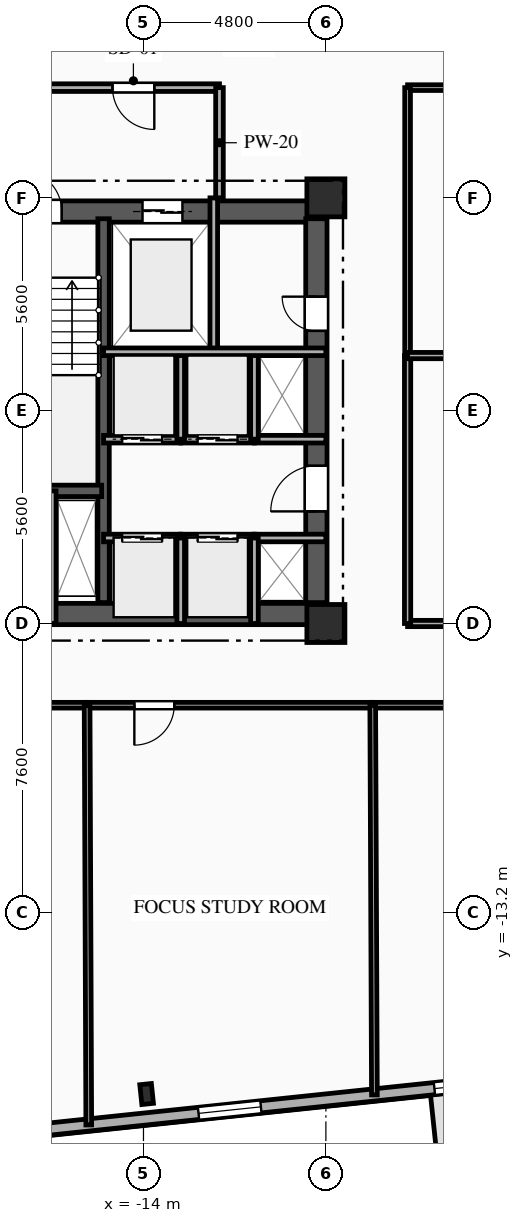
"""IFC4 building model, lengths in metres.
Left out: names, types, materials, properties, quantities, classifications, styles, units other than length and angle.
Written with IfcOpenShell. Run it as: python <this file> out.ifc"""

import sys

from ifc_helpers import new_model, si_unit, direction, frame, frame_2d, origin, origin_2d, place, context, subcontext, project, spatial, rectangle, i_section, extrude, element, fill, save


model = new_model("IFC4")
c1 = context("Model", 3, precision=1e-05, world=origin(), true_north=direction((0.0, 1.0)))
c2 = subcontext(c1, "Body", "Model", "MODEL_VIEW")
j1 = project(units=[si_unit("LENGTHUNIT", "METRE"), si_unit("PLANEANGLEUNIT", "RADIAN")], contexts=[c1])
p1 = place(None, origin())
s1 = spatial("IfcSite", under=j1, at=p1, CompositionType="ELEMENT")
p2 = place(p1, origin())
s2 = spatial("IfcBuilding", under=s1, at=p2, CompositionType="ELEMENT")
p3 = place(p2, frame((0.0, 0.0, 99.1)))
s3 = spatial("IfcBuildingStorey", under=s2, at=p3, CompositionType="ELEMENT", Elevation=99.1)
for number, where, z_axis, x_axis in (
    (1, (-9.2, -5.6, 0.0), (0.0, 0.0, 1.0), (1.0, 0.0, 0.0)),
    (2, (-9.2, 5.6, 0.0), (0.0, 0.0, 1.0), (1.0, 0.0, 0.0)),
):
    element("IfcColumn", number, at=place(p3, frame(where, z_axis=z_axis, x_axis=x_axis)), inside=s3, PredefinedType="COLUMN", context=c2, shape_type="SweptSolid", body=[
        extrude(rectangle(XDim=1.0, YDim=1.0, at=origin_2d()), origin(), (0.0, 0.0, 1.0), 3.35),
    ])
p4 = place(p3, frame((-13.917, -17.98, 0.0), z_axis=(0.0, 0.0, 1.0), x_axis=(0.994521895368, 0.104528463268, 0.0)))
e3 = element("IfcColumn", 3, at=p4, inside=s3, PredefinedType="COLUMN", context=c2, shape_type="SweptSolid", body=[
    extrude(i_section(OverallWidth=0.306, OverallDepth=0.524, WebThickness=0.021, FlangeThickness=0.04, FilletRadius=0.027, at=origin_2d()), origin(), (0.0, 0.0, 1.0), 3.35),
])
p5 = place(p3, frame((-2.015, -17.383, 0.0), z_axis=(0.0, 0.0, 1.0), x_axis=(-0.994521393935, -0.104533233979, 0.0)))
e4 = element("IfcWall", 4, at=p5, inside=s3, PredefinedType="SOLIDWALL", context=c2, shape_type="SweptSolid", body=[
    extrude(rectangle(XDim=21.3, YDim=0.32, at=frame_2d((10.65, 0.0))), origin(), (0.0, 0.0, 1.0), 3.045),
])
p6 = place(p5, frame((1.953, 0.0, 0.85)))
e5 = element("IfcOpeningElement", 5, at=p6, cuts=e4, PredefinedType="OPENING", context=c2, shape_type="SweptSolid", body=[
    extrude(rectangle(XDim=2.4, YDim=1.95, at=frame_2d((1.2, 0.975))), frame((0.0, 0.17, 0.0), z_axis=(0.0, -1.0, 0.0), x_axis=(1.0, 0.0, 0.0)), (0.0, 0.0, 1.0), 0.34),
])
p7 = place(p5, frame((8.944, 0.0, 0.85)))
e6 = element("IfcOpeningElement", 6, at=p7, cuts=e4, PredefinedType="OPENING", context=c2, shape_type="SweptSolid", body=[
    extrude(rectangle(XDim=1.65, YDim=1.85, at=frame_2d((0.825, 0.925))), frame((0.0, 0.17, 0.0), z_axis=(0.0, -1.0, 0.0), x_axis=(1.0, 0.0, 0.0)), (0.0, 0.0, 1.0), 0.34),
])
p8 = place(p5, frame((16.391, 0.0, 0.85)))
e7 = element("IfcOpeningElement", 7, at=p8, cuts=e4, PredefinedType="OPENING", context=c2, shape_type="SweptSolid", body=[
    extrude(rectangle(XDim=1.65, YDim=1.85, at=frame_2d((0.825, 0.925))), frame((0.0, 0.17, 0.0), z_axis=(0.0, -1.0, 0.0), x_axis=(1.0, 0.0, 0.0)), (0.0, 0.0, 1.0), 0.34),
])
p9 = place(p3, frame((-18.8, 5.24, 0.0), z_axis=(0.0, 0.0, 1.0), x_axis=(1.0, 0.0, 0.0)))
e8 = element("IfcWall", 8, at=p9, inside=s3, PredefinedType="SHEAR", context=c2, shape_type="SweptSolid", body=[
    extrude(rectangle(XDim=9.6, YDim=0.56, at=frame_2d((4.8, 0.0))), origin(), (0.0, 0.0, 1.0), 3.045),
])
p10 = place(p9, frame((1.55, 0.0, 0.0)))
e9 = element("IfcOpeningElement", 9, at=p10, cuts=e8, PredefinedType="OPENING", context=c2, shape_type="SweptSolid", body=[
    extrude(rectangle(XDim=1.1, YDim=2.15, at=frame_2d((0.55, 1.075))), frame((0.0, 0.29, 0.0), z_axis=(0.0, -1.0, 0.0), x_axis=(1.0, 0.0, 0.0)), (0.0, 0.0, 1.0), 0.58),
])
p11 = place(p9, frame((4.775, 0.0, 0.0)))
e10 = element("IfcOpeningElement", 10, at=p11, cuts=e8, PredefinedType="OPENING", context=c2, shape_type="SweptSolid", body=[
    extrude(rectangle(XDim=1.05, YDim=2.1, at=frame_2d((0.525, 1.05))), frame((0.0, 0.29, 0.0), z_axis=(0.0, -1.0, 0.0), x_axis=(1.0, 0.0, 0.0)), (0.0, 0.0, 1.0), 0.58),
])
p12 = place(p3, frame((-18.8, -5.35, 0.0), z_axis=(0.0, 0.0, 1.0), x_axis=(1.0, 0.0, 0.0)))
e11 = element("IfcWall", 11, at=p12, inside=s3, PredefinedType="SHEAR", context=c2, shape_type="SweptSolid", body=[
    extrude(rectangle(XDim=9.6, YDim=0.56, at=frame_2d((4.8, 0.0))), origin(), (0.0, 0.0, 1.0), 3.045),
])
p13 = place(p12, frame((1.05, 0.0, 0.0)))
e12 = element("IfcOpeningElement", 12, at=p13, cuts=e11, PredefinedType="OPENING", context=c2, shape_type="SweptSolid", body=[
    extrude(rectangle(XDim=0.9, YDim=2.1, at=frame_2d((0.45, 1.05))), frame((0.0, 0.29, 0.0), z_axis=(0.0, -1.0, 0.0), x_axis=(1.0, 0.0, 0.0)), (0.0, 0.0, 1.0), 0.58),
])
p14 = place(p3, frame((-9.45, -5.05, 0.0), z_axis=(0.0, 0.0, 1.0), x_axis=(0.0, 1.0, 0.0)))
e13 = element("IfcWall", 13, at=p14, inside=s3, PredefinedType="SHEAR", context=c2, shape_type="SweptSolid", body=[
    extrude(rectangle(XDim=10.1, YDim=0.56, at=frame_2d((5.05, 0.0))), origin(), (0.0, 0.0, 1.0), 3.045),
])
p15 = place(p14, frame((7.15, 0.0, 0.0)))
e14 = element("IfcOpeningElement", 14, at=p15, cuts=e13, PredefinedType="OPENING", context=c2, shape_type="SweptSolid", body=[
    extrude(rectangle(XDim=0.9, YDim=2.1, at=frame_2d((0.45, 1.05))), frame((0.0, 0.29, 0.0), z_axis=(0.0, -1.0, 0.0), x_axis=(1.0, 0.0, 0.0)), (0.0, 0.0, 1.0), 0.58),
])
p16 = place(p14, frame((2.4, 0.0, 0.0)))
e15 = element("IfcOpeningElement", 15, at=p16, cuts=e13, PredefinedType="OPENING", context=c2, shape_type="SweptSolid", body=[
    extrude(rectangle(XDim=1.2, YDim=2.15, at=frame_2d((0.6, 1.075))), frame((0.0, 0.29, 0.0), z_axis=(0.0, -1.0, 0.0), x_axis=(1.0, 0.0, 0.0)), (0.0, 0.0, 1.0), 0.58),
])
p17 = place(p3, frame((-15.05, -5.05, 0.0), z_axis=(0.0, 0.0, 1.0), x_axis=(0.0, 1.0, 0.0)))
e16 = element("IfcWall", 16, at=p17, inside=s3, PredefinedType="SHEAR", context=c2, shape_type="SweptSolid", body=[
    extrude(rectangle(XDim=10.1, YDim=0.3, at=frame_2d((5.05, 0.0))), origin(), (0.0, 0.0, 1.0), 3.045),
])
p18 = place(p3, frame((-18.28, -2.11, 0.0), z_axis=(0.0, 0.0, 1.0), x_axis=(1.0, 0.0, 0.0)))
e17 = element("IfcWall", 17, at=p18, inside=s3, PredefinedType="SHEAR", context=c2, shape_type="SweptSolid", body=[
    extrude(rectangle(XDim=3.18, YDim=0.3, at=frame_2d((1.59, 0.0))), origin(), (0.0, 0.0, 1.0), 3.045),
])
p19 = place(p3, frame((-16.4, -5.6, 0.0), z_axis=(0.0, 0.0, 1.0), x_axis=(0.0, 1.0, 0.0)))
e18 = element("IfcWall", 18, at=p19, inside=s3, PredefinedType="PARTITIONING", context=c2, shape_type="SweptSolid", body=[
    extrude(rectangle(XDim=3.49, YDim=0.2, at=frame_2d((1.745, 0.0))), origin(), (0.0, 0.0, 1.0), 3.045),
])
p20 = place(p3, frame((-12.15, 1.55, 0.0), z_axis=(0.0, 0.0, 1.0), x_axis=(0.0, 1.0, 0.0)))
e19 = element("IfcWall", 19, at=p20, inside=s3, PredefinedType="PARTITIONING", context=c2, shape_type="SweptSolid", body=[
    extrude(rectangle(XDim=4.05, YDim=0.2, at=frame_2d((2.025, 0.0))), origin(), (0.0, 0.0, 1.0), 3.045),
])
p21 = place(p3, frame((-12.0, 8.5, 0.0), z_axis=(0.0, 0.0, 1.0), x_axis=(-1.0, 0.0, 0.0)))
e20 = element("IfcWall", 20, at=p21, inside=s3, PredefinedType="PARTITIONING", context=c2, shape_type="SweptSolid", body=[
    extrude(rectangle(XDim=6.8, YDim=0.2, at=frame_2d((3.4, 0.0))), origin(), (0.0, 0.0, 1.0), 3.045),
])
p22 = place(p21, frame((1.715, 0.0, 0.0)))
e21 = element("IfcOpeningElement", 21, at=p22, cuts=e20, PredefinedType="OPENING", context=c2, shape_type="SweptSolid", body=[
    extrude(rectangle(XDim=1.1, YDim=2.15, at=frame_2d((0.55, 1.075))), frame((0.0, 0.11, 0.0), z_axis=(0.0, -1.0, 0.0), x_axis=(1.0, 0.0, 0.0)), (0.0, 0.0, 1.0), 0.22),
])
p23 = place(p3, frame((-12.0, 5.6, 0.0), z_axis=(0.0, 0.0, 1.0), x_axis=(0.0, 1.0, 0.0)))
e22 = element("IfcWall", 22, at=p23, inside=s3, PredefinedType="PARTITIONING", context=c2, shape_type="SweptSolid", body=[
    extrude(rectangle(XDim=2.9, YDim=0.2, at=frame_2d((1.45, 0.0))), origin(), (0.0, 0.0, 1.0), 3.045),
])
p24 = place(p3, frame((-15.05, -3.35, 0.0), z_axis=(0.0, 0.0, 1.0), x_axis=(1.0, 0.0, 0.0)))
e23 = element("IfcWall", 23, at=p24, inside=s3, PredefinedType="PARTITIONING", context=c2, shape_type="SweptSolid", body=[
    extrude(rectangle(XDim=2.03, YDim=0.2, at=frame_2d((1.015, 0.0))), origin(), (0.0, 0.0, 1.0), 3.045),
])
p25 = place(p24, frame((0.49, 0.0, 0.0)))
e24 = element("IfcOpeningElement", 24, at=p25, cuts=e23, PredefinedType="OPENING", context=c2, shape_type="SweptSolid", body=[
    extrude(rectangle(XDim=1.05, YDim=2.1, at=frame_2d((0.525, 1.05))), frame((0.0, 0.11, 0.0), z_axis=(0.0, -1.0, 0.0), x_axis=(1.0, 0.0, 0.0)), (0.0, 0.0, 1.0), 0.22),
])
p26 = place(p3, frame((-13.02, -3.35, 0.0), z_axis=(0.0, 0.0, 1.0), x_axis=(1.0, 0.0, 0.0)))
e25 = element("IfcWall", 25, at=p26, inside=s3, PredefinedType="PARTITIONING", context=c2, shape_type="SweptSolid", body=[
    extrude(rectangle(XDim=1.94, YDim=0.2, at=frame_2d((0.97, 0.0))), origin(), (0.0, 0.0, 1.0), 3.045),
])
p27 = place(p26, frame((0.445, 0.0, 0.0)))
e26 = element("IfcOpeningElement", 26, at=p27, cuts=e25, PredefinedType="OPENING", context=c2, shape_type="SweptSolid", body=[
    extrude(rectangle(XDim=1.05, YDim=2.1, at=frame_2d((0.525, 1.05))), frame((0.0, 0.11, 0.0), z_axis=(0.0, -1.0, 0.0), x_axis=(1.0, 0.0, 0.0)), (0.0, 0.0, 1.0), 0.22),
])
p28 = place(p3, frame((-11.08, -3.35, 0.0), z_axis=(0.0, 0.0, 1.0), x_axis=(1.0, 0.0, 0.0)))
e27 = element("IfcWall", 27, at=p28, inside=s3, PredefinedType="PARTITIONING", context=c2, shape_type="SweptSolid", body=[
    extrude(rectangle(XDim=1.88, YDim=0.2, at=frame_2d((0.94, 0.0))), origin(), (0.0, 0.0, 1.0), 2.76),
])
p29 = place(p3, frame((-13.02, -0.75, 0.0), z_axis=(0.0, 0.0, 1.0), x_axis=(-1.0, 0.0, 0.0)))
e28 = element("IfcWall", 28, at=p29, inside=s3, PredefinedType="PARTITIONING", context=c2, shape_type="SweptSolid", body=[
    extrude(rectangle(XDim=2.03, YDim=0.2, at=frame_2d((1.015, 0.0))), origin(), (0.0, 0.0, 1.0), 3.045),
])
p30 = place(p29, frame((0.49, 0.0, 0.0)))
e29 = element("IfcOpeningElement", 29, at=p30, cuts=e28, PredefinedType="OPENING", context=c2, shape_type="SweptSolid", body=[
    extrude(rectangle(XDim=1.05, YDim=2.1, at=frame_2d((0.525, 1.05))), frame((0.0, 0.11, 0.0), z_axis=(0.0, -1.0, 0.0), x_axis=(1.0, 0.0, 0.0)), (0.0, 0.0, 1.0), 0.22),
])
p31 = place(p3, frame((-11.08, -0.75, 0.0), z_axis=(0.0, 0.0, 1.0), x_axis=(-1.0, 0.0, 0.0)))
e30 = element("IfcWall", 30, at=p31, inside=s3, PredefinedType="PARTITIONING", context=c2, shape_type="SweptSolid", body=[
    extrude(rectangle(XDim=1.94, YDim=0.2, at=frame_2d((0.97, 0.0))), origin(), (0.0, 0.0, 1.0), 3.045),
])
p32 = place(p31, frame((0.445, 0.0, 0.0)))
e31 = element("IfcOpeningElement", 31, at=p32, cuts=e30, PredefinedType="OPENING", context=c2, shape_type="SweptSolid", body=[
    extrude(rectangle(XDim=1.05, YDim=2.1, at=frame_2d((0.525, 1.05))), frame((0.0, 0.11, 0.0), z_axis=(0.0, -1.0, 0.0), x_axis=(1.0, 0.0, 0.0)), (0.0, 0.0, 1.0), 0.22),
])
p33 = place(p3, frame((-9.2, -0.75, 0.0), z_axis=(0.0, 0.0, 1.0), x_axis=(-1.0, 0.0, 0.0)))
e32 = element("IfcWall", 32, at=p33, inside=s3, PredefinedType="PARTITIONING", context=c2, shape_type="SweptSolid", body=[
    extrude(rectangle(XDim=1.88, YDim=0.2, at=frame_2d((0.94, 0.0))), origin(), (0.0, 0.0, 1.0), 3.045),
])
for number, where, z_axis, x_axis in (
    (33, (-13.02, -5.6, 0.0), (0.0, 0.0, 1.0), (0.0, 1.0, 0.0)),
    (34, (-11.08, -5.6, 0.0), (0.0, 0.0, 1.0), (0.0, 1.0, 0.0)),
):
    element("IfcWall", number, at=place(p3, frame(where, z_axis=z_axis, x_axis=x_axis)), inside=s3, PredefinedType="PARTITIONING", context=c2, shape_type="SweptSolid", body=[
        extrude(rectangle(XDim=2.25, YDim=0.2, at=frame_2d((1.125, 0.0))), origin(), (0.0, 0.0, 1.0), 3.045),
    ])
for number, where, z_axis, x_axis in (
    (35, (-13.02, -0.75, 0.0), (0.0, 0.0, 1.0), (0.0, 1.0, 0.0)),
    (36, (-11.08, -0.75, 0.0), (0.0, 0.0, 1.0), (0.0, 1.0, 0.0)),
):
    element("IfcWall", number, at=place(p3, frame(where, z_axis=z_axis, x_axis=x_axis)), inside=s3, PredefinedType="PARTITIONING", context=c2, shape_type="SweptSolid", body=[
        extrude(rectangle(XDim=2.3, YDim=0.2, at=frame_2d((1.15, 0.0))), origin(), (0.0, 0.0, 1.0), 3.045),
    ])
p34 = place(p3, frame((0.0, 8.5, 0.0), z_axis=(0.0, 0.0, 1.0), x_axis=(-1.0, 0.0, 0.0)))
e37 = element("IfcWall", 37, at=p34, inside=s3, PredefinedType="PARTITIONING", context=c2, shape_type="SweptSolid", body=[
    extrude(rectangle(XDim=7.05, YDim=0.15, at=frame_2d((3.525, 0.0))), origin(), (0.0, 0.0, 1.0), 3.045),
])
p35 = place(p34, frame((1.185, 0.0, 0.0)))
e38 = element("IfcOpeningElement", 38, at=p35, cuts=e37, PredefinedType="OPENING", context=c2, shape_type="SweptSolid", body=[
    extrude(rectangle(XDim=1.05, YDim=2.15, at=frame_2d((0.525, 1.075))), frame((0.0, 0.085, 0.0), z_axis=(0.0, -1.0, 0.0), x_axis=(1.0, 0.0, 0.0)), (0.0, 0.0, 1.0), 0.17),
])
p36 = place(p3, frame((-15.483, -7.75, 0.0), z_axis=(0.0, 0.0, 1.0), x_axis=(-1.0, 0.0, 0.0)))
e39 = element("IfcWall", 39, at=p36, inside=s3, PredefinedType="PARTITIONING", context=c2, shape_type="SweptSolid", body=[
    extrude(rectangle(XDim=7.517, YDim=0.15, at=frame_2d((3.758, 0.0))), origin(), (0.0, 0.0, 1.0), 3.045),
])
p37 = place(p36, frame((5.223, 0.0, 0.0)))
e40 = element("IfcOpeningElement", 40, at=p37, cuts=e39, PredefinedType="OPENING", context=c2, shape_type="SweptSolid", body=[
    extrude(rectangle(XDim=1.05, YDim=2.15, at=frame_2d((0.525, 1.075))), frame((0.0, 0.085, 0.0), z_axis=(0.0, -1.0, 0.0), x_axis=(1.0, 0.0, 0.0)), (0.0, 0.0, 1.0), 0.17),
])
p38 = place(p3, frame((-7.967, -7.75, 0.0), z_axis=(0.0, 0.0, 1.0), x_axis=(-1.0, 0.0, 0.0)))
e41 = element("IfcWall", 41, at=p38, inside=s3, PredefinedType="PARTITIONING", context=c2, shape_type="SweptSolid", body=[
    extrude(rectangle(XDim=7.516, YDim=0.15, at=frame_2d((3.758, 0.0))), origin(), (0.0, 0.0, 1.0), 3.045),
])
p39 = place(p38, frame((5.223, 0.0, 0.0)))
e42 = element("IfcOpeningElement", 42, at=p39, cuts=e41, PredefinedType="OPENING", context=c2, shape_type="SweptSolid", body=[
    extrude(rectangle(XDim=1.05, YDim=2.15, at=frame_2d((0.525, 1.075))), frame((0.0, 0.085, 0.0), z_axis=(0.0, -1.0, 0.0), x_axis=(1.0, 0.0, 0.0)), (0.0, 0.0, 1.0), 0.17),
])
p40 = place(p3, frame((0.0, -7.75, 0.0), z_axis=(0.0, 0.0, 1.0), x_axis=(-1.0, 0.0, 0.0)))
e43 = element("IfcWall", 43, at=p40, inside=s3, PredefinedType="PARTITIONING", context=c2, shape_type="SweptSolid", body=[
    extrude(rectangle(XDim=7.967, YDim=0.15, at=frame_2d((3.983, 0.0))), origin(), (0.0, 0.0, 1.0), 3.045),
])
p41 = place(p40, frame((1.3, 0.0, 0.0)))
e44 = element("IfcOpeningElement", 44, at=p41, cuts=e43, PredefinedType="OPENING", context=c2, shape_type="SweptSolid", body=[
    extrude(rectangle(XDim=1.05, YDim=2.15, at=frame_2d((0.525, 1.075))), frame((0.0, 0.085, 0.0), z_axis=(0.0, -1.0, 0.0), x_axis=(1.0, 0.0, 0.0)), (0.0, 0.0, 1.0), 0.17),
])
p42 = place(p3, frame((-7.05, -5.6, 0.0), z_axis=(0.0, 0.0, 1.0), x_axis=(1.0, 0.0, 0.0)))
e45 = element("IfcWall", 45, at=p42, inside=s3, PredefinedType="PARTITIONING", context=c2, shape_type="SweptSolid", body=[
    extrude(rectangle(XDim=7.05, YDim=0.165, at=frame_2d((3.525, 0.0))), origin(), (0.0, 0.0, 1.0), 2.53),
])
p43 = place(p42, frame((4.728, 0.0, 0.0)))
e46 = element("IfcOpeningElement", 46, at=p43, cuts=e45, PredefinedType="OPENING", context=c2, shape_type="SweptSolid", body=[
    extrude(rectangle(XDim=1.15, YDim=2.15, at=frame_2d((0.575, 1.075))), frame((0.0, 0.093, 0.0), z_axis=(0.0, -1.0, 0.0), x_axis=(1.0, 0.0, 0.0)), (0.0, 0.0, 1.0), 0.185),
])
p44 = place(p3, frame((-7.05, 1.45, 0.0), z_axis=(0.0, 0.0, 1.0), x_axis=(0.0, -1.0, 0.0)))
e47 = element("IfcWall", 47, at=p44, inside=s3, PredefinedType="PARTITIONING", context=c2, shape_type="SweptSolid", body=[
    extrude(rectangle(XDim=7.05, YDim=0.165, at=frame_2d((3.525, 0.0))), origin(), (0.0, 0.0, 1.0), 3.045),
])
p45 = place(p3, frame((-7.05, 8.5, 0.0), z_axis=(0.0, 0.0, 1.0), x_axis=(0.0, -1.0, 0.0)))
e48 = element("IfcWall", 48, at=p45, inside=s3, PredefinedType="PARTITIONING", context=c2, shape_type="SweptSolid", body=[
    extrude(rectangle(XDim=7.05, YDim=0.15, at=frame_2d((3.525, 0.0))), origin(), (0.0, 0.0, 1.0), 3.045),
])
p46 = place(p3, frame((-15.483, -7.75, 0.0), z_axis=(0.0, 0.0, 1.0), x_axis=(0.003956994399, -0.999992171067, 0.0)))
e49 = element("IfcWall", 49, at=p46, inside=s3, PredefinedType="PARTITIONING", context=c2, shape_type="SweptSolid", body=[
    extrude(rectangle(XDim=11.044, YDim=0.15, at=frame_2d((5.522, 0.0))), origin(), (0.0, 0.0, 1.0), 3.045),
])
p47 = place(p3, frame((-7.967, -7.75, 0.0), z_axis=(0.0, 0.0, 1.0), x_axis=(0.004285674928, -0.999990816453, 0.0)))
e50 = element("IfcWall", 50, at=p47, inside=s3, PredefinedType="PARTITIONING", context=c2, shape_type="SweptSolid", body=[
    extrude(rectangle(XDim=10.254, YDim=0.15, at=frame_2d((5.127, 0.0))), origin(), (0.0, 0.0, 1.0), 3.045),
])
p48 = place(p3, frame((-7.05, 1.45, 0.0), z_axis=(0.0, 0.0, 1.0), x_axis=(1.0, 0.0, 0.0)))
e51 = element("IfcWall", 51, at=p48, inside=s3, PredefinedType="PARTITIONING", context=c2, shape_type="SweptSolid", body=[
    extrude(rectangle(XDim=14.1, YDim=0.165, at=frame_2d((7.05, 0.0))), origin(), (0.0, 0.0, 1.0), 3.045),
])
p49 = place(p3, frame((-15.05, 1.55, 0.0), z_axis=(0.0, 0.0, 1.0), x_axis=(1.0, 0.0, 0.0)))
e52 = element("IfcWall", 52, at=p49, inside=s3, PredefinedType="PARTITIONING", context=c2, shape_type="SweptSolid", body=[
    extrude(rectangle(XDim=5.85, YDim=0.2, at=frame_2d((2.925, 0.0))), origin(), (0.0, 0.0, 1.0), 3.045),
])
p50 = place(p6, origin())
e53 = element("IfcWindow", 53, at=p50, inside=s3, PartitioningType="SINGLE_PANEL", PredefinedType="WINDOW", context=c2, shape_type="SweptSolid", body=[
    extrude(rectangle(XDim=2.4, YDim=1.95, at=frame_2d((1.2, 0.975))), frame((0.0, 0.03, 0.0), z_axis=(0.0, -1.0, 0.0), x_axis=(1.0, 0.0, 0.0)), (0.0, 0.0, 1.0), 0.06),
])
fill(e5, e53)
p51 = place(p7, origin())
e54 = element("IfcWindow", 54, at=p51, inside=s3, PartitioningType="SINGLE_PANEL", PredefinedType="WINDOW", context=c2, shape_type="SweptSolid", body=[
    extrude(rectangle(XDim=1.65, YDim=1.85, at=frame_2d((0.825, 0.925))), frame((0.0, 0.03, 0.0), z_axis=(0.0, -1.0, 0.0), x_axis=(1.0, 0.0, 0.0)), (0.0, 0.0, 1.0), 0.06),
])
fill(e6, e54)
p52 = place(p10, origin())
e55 = element("IfcDoor", 55, at=p52, inside=s3, OperationType="SINGLE_SWING_LEFT", PredefinedType="DOOR", context=c2, shape_type="SweptSolid", body=[
    extrude(rectangle(XDim=1.1, YDim=2.15, at=frame_2d((0.55, 1.075))), frame((0.0, 0.025, 0.0), z_axis=(0.0, -1.0, 0.0), x_axis=(1.0, 0.0, 0.0)), (0.0, 0.0, 1.0), 0.05),
])
fill(e9, e55)
p53 = place(p11, origin())
e56 = element("IfcDoor", 56, at=p53, inside=s3, OperationType="DOUBLE_DOOR_SLIDING", PredefinedType="DOOR", context=c2, shape_type="SweptSolid", body=[
    extrude(rectangle(XDim=1.05, YDim=2.1, at=frame_2d((0.525, 1.05))), frame((0.0, 0.025, 0.0), z_axis=(0.0, -1.0, 0.0), x_axis=(1.0, 0.0, 0.0)), (0.0, 0.0, 1.0), 0.05),
])
fill(e10, e56)
p54 = place(p22, origin())
e57 = element("IfcDoor", 57, at=p54, inside=s3, OperationType="SINGLE_SWING_LEFT", PredefinedType="DOOR", context=c2, shape_type="SweptSolid", body=[
    extrude(rectangle(XDim=1.1, YDim=2.15, at=frame_2d((0.55, 1.075))), frame((0.0, 0.025, 0.0), z_axis=(0.0, -1.0, 0.0), x_axis=(1.0, 0.0, 0.0)), (0.0, 0.0, 1.0), 0.05),
])
fill(e21, e57)
p55 = place(p15, origin())
e58 = element("IfcDoor", 58, at=p55, inside=s3, OperationType="SINGLE_SWING_RIGHT", PredefinedType="DOOR", context=c2, shape_type="SweptSolid", body=[
    extrude(rectangle(XDim=0.9, YDim=2.1, at=frame_2d((0.45, 1.05))), frame((0.0, 0.025, 0.0), z_axis=(0.0, -1.0, 0.0), x_axis=(1.0, 0.0, 0.0)), (0.0, 0.0, 1.0), 0.05),
])
fill(e14, e58)
p56 = place(p25, origin())
e59 = element("IfcDoor", 59, at=p56, inside=s3, OperationType="DOUBLE_DOOR_SLIDING", PredefinedType="DOOR", context=c2, shape_type="SweptSolid", body=[
    extrude(rectangle(XDim=1.05, YDim=2.1, at=frame_2d((0.525, 1.05))), frame((0.0, 0.025, 0.0), z_axis=(0.0, -1.0, 0.0), x_axis=(1.0, 0.0, 0.0)), (0.0, 0.0, 1.0), 0.05),
])
fill(e24, e59)
p57 = place(p27, origin())
e60 = element("IfcDoor", 60, at=p57, inside=s3, OperationType="DOUBLE_DOOR_SLIDING", PredefinedType="DOOR", context=c2, shape_type="SweptSolid", body=[
    extrude(rectangle(XDim=1.05, YDim=2.1, at=frame_2d((0.525, 1.05))), frame((0.0, 0.025, 0.0), z_axis=(0.0, -1.0, 0.0), x_axis=(1.0, 0.0, 0.0)), (0.0, 0.0, 1.0), 0.05),
])
fill(e26, e60)
p58 = place(p30, origin())
e61 = element("IfcDoor", 61, at=p58, inside=s3, OperationType="DOUBLE_DOOR_SLIDING", PredefinedType="DOOR", context=c2, shape_type="SweptSolid", body=[
    extrude(rectangle(XDim=1.05, YDim=2.1, at=frame_2d((0.525, 1.05))), frame((0.0, 0.025, 0.0), z_axis=(0.0, -1.0, 0.0), x_axis=(1.0, 0.0, 0.0)), (0.0, 0.0, 1.0), 0.05),
])
fill(e29, e61)
p59 = place(p32, origin())
e62 = element("IfcDoor", 62, at=p59, inside=s3, OperationType="DOUBLE_DOOR_SLIDING", PredefinedType="DOOR", context=c2, shape_type="SweptSolid", body=[
    extrude(rectangle(XDim=1.05, YDim=2.1, at=frame_2d((0.525, 1.05))), frame((0.0, 0.025, 0.0), z_axis=(0.0, -1.0, 0.0), x_axis=(1.0, 0.0, 0.0)), (0.0, 0.0, 1.0), 0.05),
])
fill(e31, e62)
p60 = place(p16, origin())
e63 = element("IfcDoor", 63, at=p60, inside=s3, OperationType="SINGLE_SWING_LEFT", PredefinedType="DOOR", context=c2, shape_type="SweptSolid", body=[
    extrude(rectangle(XDim=1.2, YDim=2.15, at=frame_2d((0.6, 1.075))), frame((0.0, 0.025, 0.0), z_axis=(0.0, -1.0, 0.0), x_axis=(1.0, 0.0, 0.0)), (0.0, 0.0, 1.0), 0.05),
])
fill(e15, e63)
p61 = place(p39, origin())
e64 = element("IfcDoor", 64, at=p61, inside=s3, OperationType="SINGLE_SWING_RIGHT", PredefinedType="DOOR", context=c2, shape_type="SweptSolid", body=[
    extrude(rectangle(XDim=1.05, YDim=2.15, at=frame_2d((0.525, 1.075))), frame((0.0, 0.025, 0.0), z_axis=(0.0, -1.0, 0.0), x_axis=(1.0, 0.0, 0.0)), (0.0, 0.0, 1.0), 0.05),
])
fill(e42, e64)
save(model, sys.argv[1])
